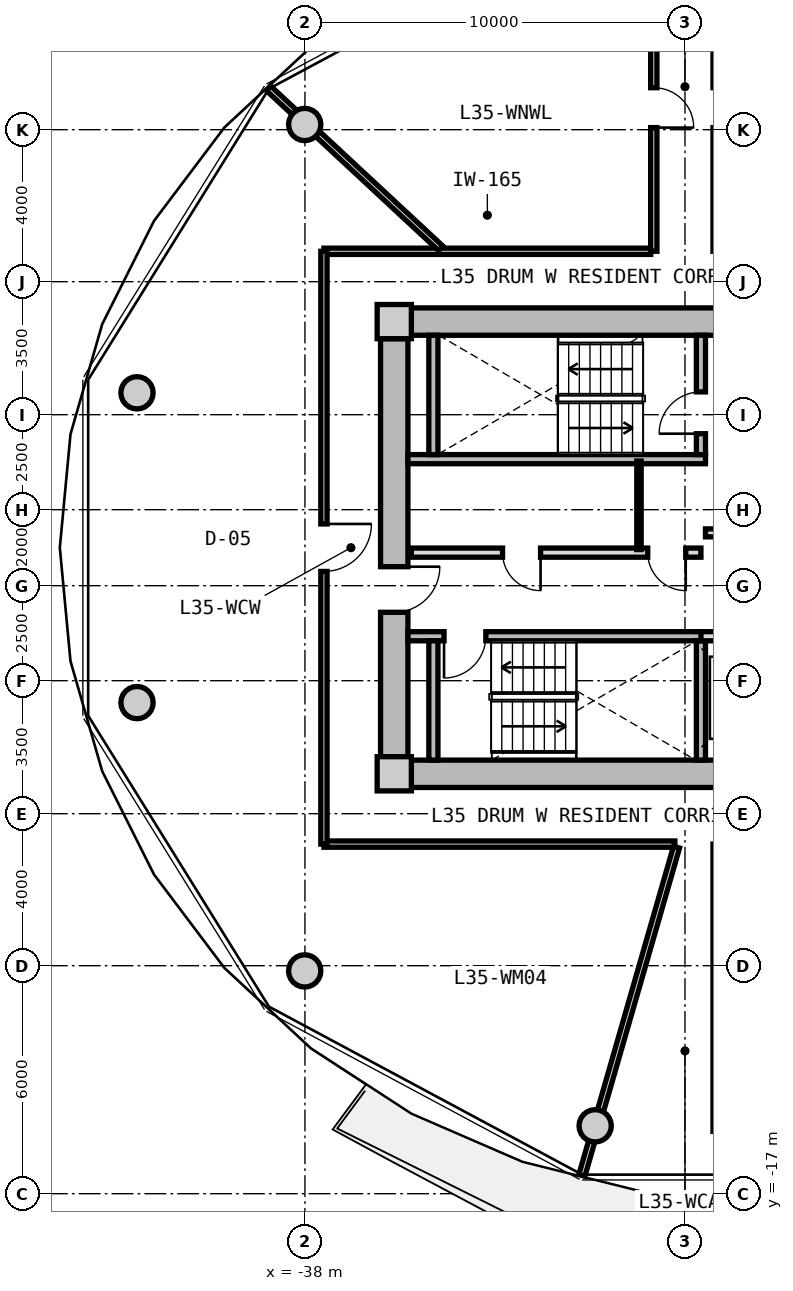
"""IFC4 building model, lengths in metres.
Left out: names, types, materials, properties, quantities, classifications, styles, units other than length and angle.
Written with IfcOpenShell. Run it as: python <this file> out.ifc"""

import sys

from ifc_helpers import new_model, si_unit, direction, frame, frame_2d, origin, origin_2d, place, context, subcontext, project, spatial, rectangle, circle, extrude, source, transform, mapped, element, fill, save


model = new_model("IFC4")
c1 = context("Model", 3, precision=1e-05, world=origin(), true_north=direction((0.0, 1.0)))
c2 = subcontext(c1, "Body", "Model", "MODEL_VIEW")
j1 = project(units=[si_unit("LENGTHUNIT", "METRE"), si_unit("PLANEANGLEUNIT", "RADIAN")], contexts=[c1])
p1 = place(None, origin())
s1 = spatial("IfcSite", under=j1, at=p1, CompositionType="ELEMENT")
p2 = place(p1, origin())
s2 = spatial("IfcBuilding", under=s1, at=p2, CompositionType="ELEMENT")
p3 = place(p2, frame((0.0, 0.0, 114.55)))
s3 = spatial("IfcBuildingStorey", under=s2, at=p3, CompositionType="ELEMENT", Elevation=114.55)
m1 = source(origin(), c2, "Body", "SweptSolid", [
    extrude(rectangle(XDim=0.9, YDim=0.9, at=origin_2d()), origin(), (0.0, 0.0, 1.0), 3.05),
])
for number, where, z_axis, x_axis in (
    (1, (-35.65, -5.95, 0.0), (0.0, 0.0, 1.0), (1.0, 0.0, 0.0)),
    (2, (-35.65, 5.95, 0.0), (0.0, 0.0, 1.0), (1.0, 0.0, 0.0)),
):
    element("IfcColumn", number, at=place(p3, frame(where, z_axis=z_axis, x_axis=x_axis)), inside=s3, PredefinedType="COLUMN", context=c2, shape_type="MappedRepresentation", body=[
        mapped(m1, transform((0.0, 0.0, 0.0), x_axis=(1.0, 0.0, 0.0), y_axis=(0.0, 1.0, 0.0), z_axis=(0.0, 0.0, 1.0), scale=1.0)),
    ])
m2 = source(origin(), c2, "Body", "SweptSolid", [
    extrude(rectangle(XDim=14.4, YDim=0.72, at=frame_2d((7.2, 0.0))), origin(), (0.0, 0.0, 1.0), 2.79),
])
for number, where, z_axis, x_axis in (
    (3, (-35.2, 5.95, 0.0), (0.0, 0.0, 1.0), (1.0, 0.0, 0.0)),
    (4, (-20.8, -5.95, 0.0), (0.0, 0.0, 1.0), (-1.0, 0.0, 0.0)),
):
    element("IfcWall", number, at=place(p3, frame(where, z_axis=z_axis, x_axis=x_axis)), inside=s3, PredefinedType="SHEAR", context=c2, shape_type="MappedRepresentation", body=[
        mapped(m2, transform((0.0, 0.0, 0.0), x_axis=(1.0, 0.0, 0.0), y_axis=(0.0, 1.0, 0.0), z_axis=(0.0, 0.0, 1.0), scale=1.0)),
    ])
m3 = source(origin(), c2, "Body", "SweptSolid", [
    extrude(rectangle(XDim=11.0, YDim=0.72, at=frame_2d((5.5, 0.0))), origin(), (0.0, 0.0, 1.0), 2.79),
])
p4 = place(p3, frame((-35.65, -5.5, 0.0), z_axis=(0.0, 0.0, 1.0), x_axis=(0.0, 1.0, 0.0)))
e5 = element("IfcWall", 5, at=p4, inside=s3, PredefinedType="SHEAR", context=c2, shape_type="MappedRepresentation", body=[
    mapped(m3, transform((0.0, 0.0, 0.0), x_axis=(1.0, 0.0, 0.0), y_axis=(0.0, 1.0, 0.0), z_axis=(0.0, 0.0, 1.0), scale=1.0)),
])
p5 = place(p4, frame((3.8, 0.0, 0.0)))
e6 = element("IfcOpeningElement", 6, at=p5, cuts=e5, PredefinedType="OPENING", context=c2, shape_type="SweptSolid", body=[
    extrude(rectangle(XDim=1.2, YDim=2.15, at=frame_2d((0.6, 1.075))), frame((0.0, 0.37, 0.0), z_axis=(0.0, -1.0, 0.0), x_axis=(1.0, 0.0, 0.0)), (0.0, 0.0, 1.0), 0.74),
])
m4 = source(origin(), c2, "Body", "SweptSolid", [
    extrude(circle(Radius=0.425, at=origin_2d()), origin(), (0.0, 0.0, 1.0), 3.05),
])
for number, where, z_axis, x_axis in (
    (7, (-38.006, 11.137, 0.0), (0.0, 0.0, 1.0), (1.0, 0.0, 0.0)),
    (8, (-42.419, 4.076, 0.0), (0.0, 0.0, 1.0), (1.0, 0.0, 0.0)),
    (9, (-42.419, -4.076, 0.0), (0.0, 0.0, 1.0), (1.0, 0.0, 0.0)),
    (10, (-38.006, -11.137, 0.0), (0.0, 0.0, 1.0), (1.0, 0.0, 0.0)),
    (11, (-30.363, -15.213, 0.0), (0.0, 0.0, 1.0), (1.0, 0.0, 0.0)),
):
    element("IfcColumn", number, at=place(p3, frame(where, z_axis=z_axis, x_axis=x_axis)), inside=s3, PredefinedType="COLUMN", context=c2, shape_type="MappedRepresentation", body=[
        mapped(m4, transform((0.0, 0.0, 0.0), x_axis=(1.0, 0.0, 0.0), y_axis=(0.0, 1.0, 0.0), z_axis=(0.0, 0.0, 1.0), scale=1.0)),
    ])
m5 = source(origin(), c2, "Body", "SweptSolid", [
    extrude(rectangle(XDim=7.83, YDim=0.24, at=frame_2d((3.915, 0.0))), origin(), (0.0, 0.0, 1.0), 2.79),
])
p6 = place(p3, frame((-35.29, 2.33, 0.0), z_axis=(0.0, 0.0, 1.0), x_axis=(1.0, 0.0, 0.0)))
e12 = element("IfcWall", 12, at=p6, inside=s3, PredefinedType="PARTITIONING", context=c2, shape_type="MappedRepresentation", body=[
    mapped(m5, transform((0.0, 0.0, 0.0), x_axis=(1.0, 0.0, 0.0), y_axis=(0.0, 1.0, 0.0), z_axis=(0.0, 0.0, 1.0), scale=1.0)),
])
m6 = source(origin(), c2, "Body", "SweptSolid", [
    extrude(rectangle(XDim=3.14, YDim=0.24, at=frame_2d((1.57, 0.0))), origin(), (0.0, 0.0, 1.0), 2.79),
])
p7 = place(p3, frame((-34.62, 2.45, 0.0), z_axis=(0.0, 0.0, 1.0), x_axis=(0.0, 1.0, 0.0)))
e13 = element("IfcWall", 13, at=p7, inside=s3, PredefinedType="PARTITIONING", context=c2, shape_type="MappedRepresentation", body=[
    mapped(m6, transform((0.0, 0.0, 0.0), x_axis=(1.0, 0.0, 0.0), y_axis=(0.0, 1.0, 0.0), z_axis=(0.0, 0.0, 1.0), scale=1.0)),
])
p8 = place(p3, frame((-27.58, 2.45, 0.0), z_axis=(0.0, 0.0, 1.0), x_axis=(0.0, 1.0, 0.0)))
e14 = element("IfcWall", 14, at=p8, inside=s3, PredefinedType="PARTITIONING", context=c2, shape_type="MappedRepresentation", body=[
    mapped(m6, transform((0.0, 0.0, 0.0), x_axis=(1.0, 0.0, 0.0), y_axis=(0.0, 1.0, 0.0), z_axis=(0.0, 0.0, 1.0), scale=1.0)),
])
p9 = place(p8, frame((0.55, 0.0, 0.0)))
e15 = element("IfcOpeningElement", 15, at=p9, cuts=e14, PredefinedType="OPENING", context=c2, shape_type="SweptSolid", body=[
    extrude(rectangle(XDim=1.1, YDim=2.15, at=frame_2d((0.55, 1.075))), frame((0.0, 0.13, 0.0), z_axis=(0.0, -1.0, 0.0), x_axis=(1.0, 0.0, 0.0)), (0.0, 0.0, 1.0), 0.26),
])
p10 = place(p3, frame((-35.29, -2.33, 0.0), z_axis=(0.0, 0.0, 1.0), x_axis=(1.0, 0.0, 0.0)))
e16 = element("IfcWall", 16, at=p10, inside=s3, PredefinedType="PARTITIONING", context=c2, shape_type="MappedRepresentation", body=[
    mapped(m5, transform((0.0, 0.0, 0.0), x_axis=(1.0, 0.0, 0.0), y_axis=(0.0, 1.0, 0.0), z_axis=(0.0, 0.0, 1.0), scale=1.0)),
])
p11 = place(p10, frame((0.95, 0.0, 0.0)))
e17 = element("IfcOpeningElement", 17, at=p11, cuts=e16, PredefinedType="OPENING", context=c2, shape_type="SweptSolid", body=[
    extrude(rectangle(XDim=1.1, YDim=2.15, at=frame_2d((0.55, 1.075))), frame((0.0, 0.13, 0.0), z_axis=(0.0, -1.0, 0.0), x_axis=(1.0, 0.0, 0.0)), (0.0, 0.0, 1.0), 0.26),
])
for number, where, z_axis, x_axis in (
    (18, (-34.62, -5.59, 0.0), (0.0, 0.0, 1.0), (0.0, 1.0, 0.0)),
    (19, (-27.58, -5.59, 0.0), (0.0, 0.0, 1.0), (0.0, 1.0, 0.0)),
):
    element("IfcWall", number, at=place(p3, frame(where, z_axis=z_axis, x_axis=x_axis)), inside=s3, PredefinedType="PARTITIONING", context=c2, shape_type="MappedRepresentation", body=[
        mapped(m6, transform((0.0, 0.0, 0.0), x_axis=(1.0, 0.0, 0.0), y_axis=(0.0, 1.0, 0.0), z_axis=(0.0, 0.0, 1.0), scale=1.0)),
    ])
m7 = source(origin(), c2, "Body", "SweptSolid", [
    extrude(rectangle(XDim=6.66, YDim=0.21, at=frame_2d((3.33, 0.0))), origin(), (0.0, 0.0, 1.0), 2.775),
])
p12 = place(p3, frame((-27.46, 0.39, 0.0), z_axis=(0.0, 0.0, 1.0), x_axis=(1.0, 0.0, 0.0)))
e20 = element("IfcWall", 20, at=p12, inside=s3, PredefinedType="PARTITIONING", context=c2, shape_type="MappedRepresentation", body=[
    mapped(m7, transform((0.0, 0.0, 0.0), x_axis=(1.0, 0.0, 0.0), y_axis=(0.0, 1.0, 0.0), z_axis=(0.0, 0.0, 1.0), scale=1.0)),
])
p13 = place(p12, frame((1.0, 0.0, 0.0)))
e21 = element("IfcOpeningElement", 21, at=p13, cuts=e20, PredefinedType="OPENING", context=c2, shape_type="SweptSolid", body=[
    extrude(rectangle(XDim=1.2, YDim=2.15, at=frame_2d((0.6, 1.075))), frame((0.0, 0.115, 0.0), z_axis=(0.0, -1.0, 0.0), x_axis=(1.0, 0.0, 0.0)), (0.0, 0.0, 1.0), 0.23),
])
m8 = source(origin(), c2, "Body", "SweptSolid", [
    extrude(rectangle(XDim=7.62, YDim=0.24, at=frame_2d((3.81, 0.0))), origin(), (0.0, 0.0, 1.0), 2.775),
])
p14 = place(p3, frame((-35.2, -0.13, 0.0), z_axis=(0.0, 0.0, 1.0), x_axis=(1.0, 0.0, 0.0)))
e22 = element("IfcWall", 22, at=p14, inside=s3, PredefinedType="PARTITIONING", context=c2, shape_type="MappedRepresentation", body=[
    mapped(m8, transform((0.0, 0.0, 0.0), x_axis=(1.0, 0.0, 0.0), y_axis=(0.0, 1.0, 0.0), z_axis=(0.0, 0.0, 1.0), scale=1.0)),
])
p15 = place(p14, frame((6.22, 0.0, 0.0)))
e23 = element("IfcOpeningElement", 23, at=p15, cuts=e22, PredefinedType="OPENING", context=c2, shape_type="SweptSolid", body=[
    extrude(rectangle(XDim=1.0, YDim=2.1, at=frame_2d((0.5, 1.05))), frame((0.0, 0.13, 0.0), z_axis=(0.0, -1.0, 0.0), x_axis=(1.0, 0.0, 0.0)), (0.0, 0.0, 1.0), 0.26),
])
p16 = place(p14, frame((2.4, 0.0, 0.0)))
e24 = element("IfcOpeningElement", 24, at=p16, cuts=e22, PredefinedType="OPENING", context=c2, shape_type="SweptSolid", body=[
    extrude(rectangle(XDim=1.0, YDim=2.1, at=frame_2d((0.5, 1.05))), frame((0.0, 0.13, 0.0), z_axis=(0.0, -1.0, 0.0), x_axis=(1.0, 0.0, 0.0)), (0.0, 0.0, 1.0), 0.26),
])
m9 = source(origin(), c2, "Body", "SweptSolid", [
    extrude(rectangle(XDim=2.33, YDim=0.115, at=frame_2d((1.165, 0.0))), origin(), (0.0, 0.0, 1.0), 2.775),
])
p17 = place(p3, frame((-29.21, -0.05, 0.0), z_axis=(0.0, 0.0, 1.0), x_axis=(0.0, 1.0, 0.0)))
e25 = element("IfcWall", 25, at=p17, inside=s3, PredefinedType="PARTITIONING", context=c2, shape_type="MappedRepresentation", body=[
    mapped(m9, transform((0.0, 0.0, 0.0), x_axis=(1.0, 0.0, 0.0), y_axis=(0.0, 1.0, 0.0), z_axis=(0.0, 0.0, 1.0), scale=1.0)),
])
m10 = source(origin(), c2, "Body", "SweptSolid", [
    extrude(rectangle(XDim=4.13, YDim=0.24, at=frame_2d((2.065, 0.0))), origin(), (0.0, 0.0, 1.0), 2.775),
])
p18 = place(p3, frame((-27.58, -2.33, 0.0), z_axis=(0.0, 0.0, 1.0), x_axis=(1.0, 0.0, 0.0)))
e26 = element("IfcWall", 26, at=p18, inside=s3, PredefinedType="PARTITIONING", context=c2, shape_type="MappedRepresentation", body=[
    mapped(m10, transform((0.0, 0.0, 0.0), x_axis=(1.0, 0.0, 0.0), y_axis=(0.0, 1.0, 0.0), z_axis=(0.0, 0.0, 1.0), scale=1.0)),
])
p19 = place(p18, frame((0.5, 0.0, 0.0)))
e27 = element("IfcOpeningElement", 27, at=p19, cuts=e26, PredefinedType="OPENING", context=c2, shape_type="SweptSolid", body=[
    extrude(rectangle(XDim=1.1, YDim=2.2, at=frame_2d((0.55, 1.1))), frame((0.0, 0.13, 0.0), z_axis=(0.0, -1.0, 0.0), x_axis=(1.0, 0.0, 0.0)), (0.0, 0.0, 1.0), 0.26),
])
m11 = source(origin(), c2, "Body", "SweptSolid", [
    extrude(rectangle(XDim=8.6, YDim=0.165, at=frame_2d((4.3, 0.0))), origin(), (0.0, 0.0, 1.0), 2.775),
])
p20 = place(p3, frame((-37.5, 7.8, 0.0), z_axis=(0.0, 0.0, 1.0), x_axis=(1.0, 0.0, 0.0)))
e28 = element("IfcWall", 28, at=p20, inside=s3, PredefinedType="PARTITIONING", context=c2, shape_type="MappedRepresentation", body=[
    mapped(m11, transform((0.0, 0.0, 0.0), x_axis=(1.0, 0.0, 0.0), y_axis=(0.0, 1.0, 0.0), z_axis=(0.0, 0.0, 1.0), scale=1.0)),
])
m12 = source(origin(), c2, "Body", "SweptSolid", [
    extrude(rectangle(XDim=9.234, YDim=0.165, at=frame_2d((4.617, 0.0))), origin(), (0.0, 0.0, 1.0), 2.775),
])
p21 = place(p3, frame((-28.266, -7.8, 0.0), z_axis=(0.0, 0.0, 1.0), x_axis=(-1.0, 0.0, 0.0)))
e29 = element("IfcWall", 29, at=p21, inside=s3, PredefinedType="PARTITIONING", context=c2, shape_type="MappedRepresentation", body=[
    mapped(m12, transform((0.0, 0.0, 0.0), x_axis=(1.0, 0.0, 0.0), y_axis=(0.0, 1.0, 0.0), z_axis=(0.0, 0.0, 1.0), scale=1.0)),
])
m13 = source(origin(), c2, "Body", "SweptSolid", [
    extrude(rectangle(XDim=15.6, YDim=0.165, at=frame_2d((7.8, 0.0))), origin(), (0.0, 0.0, 1.0), 2.775),
])
p22 = place(p3, frame((-37.5, -7.8, 0.0), z_axis=(0.0, 0.0, 1.0), x_axis=(0.0, 1.0, 0.0)))
e30 = element("IfcWall", 30, at=p22, inside=s3, PredefinedType="PARTITIONING", context=c2, shape_type="MappedRepresentation", body=[
    mapped(m13, transform((0.0, 0.0, 0.0), x_axis=(1.0, 0.0, 0.0), y_axis=(0.0, 1.0, 0.0), z_axis=(0.0, 0.0, 1.0), scale=1.0)),
])
p23 = place(p22, frame((7.175, 0.0, 0.0)))
e31 = element("IfcOpeningElement", 31, at=p23, cuts=e30, PredefinedType="OPENING", context=c2, shape_type="SweptSolid", body=[
    extrude(rectangle(XDim=1.25, YDim=2.2, at=frame_2d((0.625, 1.1))), frame((0.0, 0.093, 0.0), z_axis=(0.0, -1.0, 0.0), x_axis=(1.0, 0.0, 0.0)), (0.0, 0.0, 1.0), 0.185),
])
m14 = source(origin(), c2, "Body", "SweptSolid", [
    extrude(rectangle(XDim=6.187, YDim=0.165, at=frame_2d((3.093, 0.0))), origin(), (0.0, 0.0, 1.0), 2.275),
])
p24 = place(p3, frame((-34.429, 7.88, 0.0), z_axis=(0.0, 0.0, 1.0), x_axis=(-0.732501077882, 0.680765870841, 0.0)))
e32 = element("IfcWall", 32, at=p24, inside=s3, PredefinedType="PARTITIONING", context=c2, shape_type="MappedRepresentation", body=[
    mapped(m14, transform((0.0, 0.0, 0.0), x_axis=(1.0, 0.0, 0.0), y_axis=(0.0, 1.0, 0.0), z_axis=(0.0, 0.0, 1.0), scale=1.0)),
])
m15 = source(origin(), c2, "Body", "SweptSolid", [
    extrude(rectangle(XDim=8.989, YDim=0.165, at=frame_2d((4.495, 0.0))), origin(), (0.0, 0.0, 1.0), 2.275),
])
p25 = place(p3, frame((-28.222, -7.88, 0.0), z_axis=(0.0, 0.0, 1.0), x_axis=(-0.27702323008, -0.960863221274, 0.0)))
e33 = element("IfcWall", 33, at=p25, inside=s3, PredefinedType="PARTITIONING", context=c2, shape_type="MappedRepresentation", body=[
    mapped(m15, transform((0.0, 0.0, 0.0), x_axis=(1.0, 0.0, 0.0), y_axis=(0.0, 1.0, 0.0), z_axis=(0.0, 0.0, 1.0), scale=1.0)),
])
m16 = source(origin(), c2, "Body", "SweptSolid", [
    extrude(rectangle(XDim=7.56, YDim=0.165, at=frame_2d((3.78, 0.0))), origin(), (0.0, 0.0, 1.0), 2.775),
])
p26 = place(p3, frame((-28.82, 7.8, 0.0), z_axis=(0.0, 0.0, 1.0), x_axis=(0.0, 1.0, 0.0)))
e34 = element("IfcWall", 34, at=p26, inside=s3, PredefinedType="PARTITIONING", context=c2, shape_type="MappedRepresentation", body=[
    mapped(m16, transform((0.0, 0.0, 0.0), x_axis=(1.0, 0.0, 0.0), y_axis=(0.0, 1.0, 0.0), z_axis=(0.0, 0.0, 1.0), scale=1.0)),
])
p27 = place(p26, frame((3.255, 0.0, 0.0)))
e35 = element("IfcOpeningElement", 35, at=p27, cuts=e34, PredefinedType="OPENING", context=c2, shape_type="SweptSolid", body=[
    extrude(rectangle(XDim=1.05, YDim=2.15, at=frame_2d((0.525, 1.075))), frame((0.0, 0.093, 0.0), z_axis=(0.0, -1.0, 0.0), x_axis=(1.0, 0.0, 0.0)), (0.0, 0.0, 1.0), 0.185),
])
m17 = source(origin(), c2, "Body", "SweptSolid", [
    extrude(rectangle(XDim=1.1, YDim=2.15, at=frame_2d((0.55, 1.075))), frame((0.0, 0.025, 0.0), z_axis=(0.0, -1.0, 0.0), x_axis=(1.0, 0.0, 0.0)), (0.0, 0.0, 1.0), 0.05),
])
p28 = place(p9, origin())
e36 = element("IfcDoor", 36, at=p28, inside=s3, OperationType="SINGLE_SWING_LEFT", PredefinedType="DOOR", context=c2, shape_type="MappedRepresentation", body=[
    mapped(m17, transform((0.0, 0.0, 0.0), x_axis=(1.0, 0.0, 0.0), y_axis=(0.0, 1.0, 0.0), z_axis=(0.0, 0.0, 1.0), scale=1.0)),
])
fill(e15, e36)
p29 = place(p11, frame((1.1, 0.0, 0.0), z_axis=(0.0, 0.0, 1.0), x_axis=(-1.0, 0.0, 0.0)))
e37 = element("IfcDoor", 37, at=p29, inside=s3, OperationType="SINGLE_SWING_RIGHT", PredefinedType="DOOR", context=c2, shape_type="MappedRepresentation", body=[
    mapped(m17, transform((0.0, 0.0, 0.0), x_axis=(1.0, 0.0, 0.0), y_axis=(0.0, 1.0, 0.0), z_axis=(0.0, 0.0, 1.0), scale=1.0)),
])
fill(e17, e37)
m18 = source(origin(), c2, "Body", "SweptSolid", [
    extrude(rectangle(XDim=1.2, YDim=2.15, at=frame_2d((0.6, 1.075))), frame((0.0, 0.025, 0.0), z_axis=(0.0, -1.0, 0.0), x_axis=(1.0, 0.0, 0.0)), (0.0, 0.0, 1.0), 0.05),
])
p30 = place(p5, frame((1.2, 0.0, 0.0), z_axis=(0.0, 0.0, 1.0), x_axis=(-1.0, 0.0, 0.0)))
e38 = element("IfcDoor", 38, at=p30, inside=s3, OperationType="SINGLE_SWING_LEFT", PredefinedType="DOOR", context=c2, shape_type="MappedRepresentation", body=[
    mapped(m18, transform((0.0, 0.0, 0.0), x_axis=(1.0, 0.0, 0.0), y_axis=(0.0, 1.0, 0.0), z_axis=(0.0, 0.0, 1.0), scale=1.0)),
])
fill(e6, e38)
m19 = source(origin(), c2, "Body", "SweptSolid", [
    extrude(rectangle(XDim=1.0, YDim=2.1, at=frame_2d((0.5, 1.05))), frame((0.0, 0.025, 0.0), z_axis=(0.0, -1.0, 0.0), x_axis=(1.0, 0.0, 0.0)), (0.0, 0.0, 1.0), 0.05),
])
p31 = place(p15, frame((1.0, 0.0, 0.0), z_axis=(0.0, 0.0, 1.0), x_axis=(-1.0, 0.0, 0.0)))
e39 = element("IfcDoor", 39, at=p31, inside=s3, OperationType="SINGLE_SWING_LEFT", PredefinedType="DOOR", context=c2, shape_type="MappedRepresentation", body=[
    mapped(m19, transform((0.0, 0.0, 0.0), x_axis=(1.0, 0.0, 0.0), y_axis=(0.0, 1.0, 0.0), z_axis=(0.0, 0.0, 1.0), scale=1.0)),
])
fill(e23, e39)
p32 = place(p16, frame((1.0, 0.0, 0.0), z_axis=(0.0, 0.0, 1.0), x_axis=(-1.0, 0.0, 0.0)))
e40 = element("IfcDoor", 40, at=p32, inside=s3, OperationType="SINGLE_SWING_LEFT", PredefinedType="DOOR", context=c2, shape_type="MappedRepresentation", body=[
    mapped(m19, transform((0.0, 0.0, 0.0), x_axis=(1.0, 0.0, 0.0), y_axis=(0.0, 1.0, 0.0), z_axis=(0.0, 0.0, 1.0), scale=1.0)),
])
fill(e24, e40)
m20 = source(origin(), c2, "Body", "SweptSolid", [
    extrude(rectangle(XDim=1.05, YDim=2.15, at=frame_2d((0.525, 1.075))), frame((0.0, 0.025, 0.0), z_axis=(0.0, -1.0, 0.0), x_axis=(1.0, 0.0, 0.0)), (0.0, 0.0, 1.0), 0.05),
])
p33 = place(p27, frame((1.05, 0.0, 0.0), z_axis=(0.0, 0.0, 1.0), x_axis=(-1.0, 0.0, 0.0)))
e41 = element("IfcDoor", 41, at=p33, inside=s3, OperationType="SINGLE_SWING_RIGHT", PredefinedType="DOOR", context=c2, shape_type="MappedRepresentation", body=[
    mapped(m20, transform((0.0, 0.0, 0.0), x_axis=(1.0, 0.0, 0.0), y_axis=(0.0, 1.0, 0.0), z_axis=(0.0, 0.0, 1.0), scale=1.0)),
])
fill(e35, e41)
m21 = source(origin(), c2, "Body", "SweptSolid", [
    extrude(rectangle(XDim=1.25, YDim=2.2, at=frame_2d((0.625, 1.1))), frame((0.0, 0.025, 0.0), z_axis=(0.0, -1.0, 0.0), x_axis=(1.0, 0.0, 0.0)), (0.0, 0.0, 1.0), 0.05),
])
p34 = place(p23, frame((1.25, 0.0, 0.0), z_axis=(0.0, 0.0, 1.0), x_axis=(-1.0, 0.0, 0.0)))
e42 = element("IfcDoor", 42, at=p34, inside=s3, OperationType="SINGLE_SWING_LEFT", PredefinedType="DOOR", context=c2, shape_type="MappedRepresentation", body=[
    mapped(m21, transform((0.0, 0.0, 0.0), x_axis=(1.0, 0.0, 0.0), y_axis=(0.0, 1.0, 0.0), z_axis=(0.0, 0.0, 1.0), scale=1.0)),
])
fill(e31, e42)
save(model, sys.argv[1])
